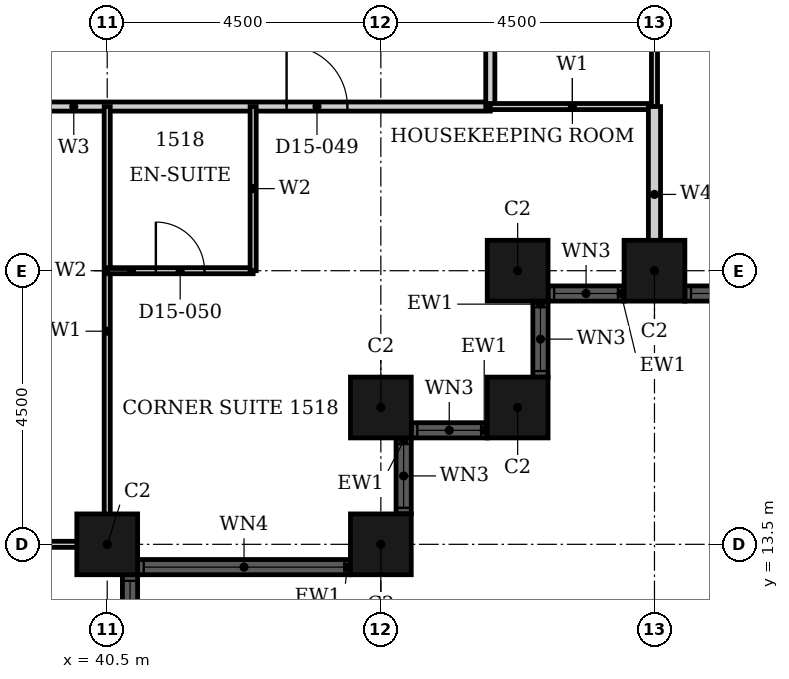
"""IFC4 building model, lengths in metres.
Left out: names, types, materials, properties, quantities, classifications, styles, units other than length and angle.
Written with IfcOpenShell. Run it as: python <this file> out.ifc"""

import sys

from ifc_helpers import new_model, si_unit, direction, frame, frame_2d, origin, origin_2d, place, context, subcontext, project, spatial, rectangle, hollow_rectangle, extrude, element, fill, save


model = new_model("IFC4")
c1 = context("Model", 3, precision=1e-05, world=origin(), true_north=direction((0.0, 1.0)))
c2 = subcontext(c1, "Body", "Model", "MODEL_VIEW")
j1 = project(units=[si_unit("LENGTHUNIT", "METRE"), si_unit("PLANEANGLEUNIT", "RADIAN")], contexts=[c1])
p1 = place(None, origin())
s1 = spatial("IfcSite", under=j1, at=p1, CompositionType="ELEMENT")
p2 = place(p1, origin())
s2 = spatial("IfcBuilding", under=s1, at=p2, CompositionType="ELEMENT")
p3 = place(p2, frame((0.0, 0.0, 67.2)))
s3 = spatial("IfcBuildingStorey", under=s2, at=p3, CompositionType="ELEMENT", Elevation=67.2)
for number, where, z_axis, x_axis in (
    (1, (40.5, 13.5, 0.0), (0.0, 0.0, 1.0), (1.0, 0.0, 0.0)),
    (2, (45.0, 13.5, 0.0), (0.0, 0.0, 1.0), (1.0, 0.0, 0.0)),
    (3, (45.0, 15.75, 0.0), (0.0, 0.0, 1.0), (1.0, 0.0, 0.0)),
    (4, (47.25, 15.75, 0.0), (0.0, 0.0, 1.0), (1.0, 0.0, 0.0)),
    (5, (47.25, 18.0, 0.0), (0.0, 0.0, 1.0), (1.0, 0.0, 0.0)),
    (6, (49.5, 18.0, 0.0), (0.0, 0.0, 1.0), (1.0, 0.0, 0.0)),
):
    element("IfcColumn", number, at=place(p3, frame(where, z_axis=z_axis, x_axis=x_axis)), inside=s3, PredefinedType="COLUMN", context=c2, shape_type="SweptSolid", body=[
        extrude(hollow_rectangle(XDim=1.0, YDim=1.0, WallThickness=0.032, at=origin_2d()), origin(), (0.0, 0.0, 1.0), 3.6),
    ])
p4 = place(p3, frame((40.875, 5.0, 0.0), z_axis=(0.0, 0.0, 1.0), x_axis=(0.0, 1.0, 0.0)))
e7 = element("IfcWall", 7, at=p4, inside=s3, PredefinedType="SOLIDWALL", context=c2, shape_type="SweptSolid", body=[
    extrude(rectangle(XDim=8.0, YDim=0.25, at=frame_2d((4.0, 0.0))), origin(), (0.0, 0.0, 1.0), 3.6),
])
p5 = place(p4, frame((0.1, 0.0, 0.9)))
e8 = element("IfcOpeningElement", 8, at=p5, cuts=e7, PredefinedType="OPENING", context=c2, shape_type="SweptSolid", body=[
    extrude(rectangle(XDim=3.3, YDim=2.08, at=frame_2d((1.65, 1.04))), frame((0.0, 0.135, 0.0), z_axis=(0.0, -1.0, 0.0), x_axis=(1.0, 0.0, 0.0)), (0.0, 0.0, 1.0), 0.27),
])
p6 = place(p4, frame((4.6, 0.0, 0.9)))
e9 = element("IfcOpeningElement", 9, at=p6, cuts=e7, PredefinedType="OPENING", context=c2, shape_type="SweptSolid", body=[
    extrude(rectangle(XDim=3.3, YDim=2.08, at=frame_2d((1.65, 1.04))), frame((0.0, 0.135, 0.0), z_axis=(0.0, -1.0, 0.0), x_axis=(1.0, 0.0, 0.0)), (0.0, 0.0, 1.0), 0.27),
])
p7 = place(p3, frame((41.0, 13.125, 0.0), z_axis=(0.0, 0.0, 1.0), x_axis=(1.0, 0.0, 0.0)))
e10 = element("IfcWall", 10, at=p7, inside=s3, PredefinedType="SOLIDWALL", context=c2, shape_type="SweptSolid", body=[
    extrude(rectangle(XDim=3.5, YDim=0.25, at=frame_2d((1.75, 0.0))), origin(), (0.0, 0.0, 1.0), 3.6),
])
p8 = place(p7, frame((0.1, 0.0, 0.9)))
e11 = element("IfcOpeningElement", 11, at=p8, cuts=e10, PredefinedType="OPENING", context=c2, shape_type="SweptSolid", body=[
    extrude(rectangle(XDim=3.3, YDim=2.08, at=frame_2d((1.65, 1.04))), frame((0.0, 0.135, 0.0), z_axis=(0.0, -1.0, 0.0), x_axis=(1.0, 0.0, 0.0)), (0.0, 0.0, 1.0), 0.27),
])
p9 = place(p3, frame((45.375, 14.0, 0.0), z_axis=(0.0, 0.0, 1.0), x_axis=(0.0, 1.0, 0.0)))
e12 = element("IfcWall", 12, at=p9, inside=s3, PredefinedType="SOLIDWALL", context=c2, shape_type="SweptSolid", body=[
    extrude(rectangle(XDim=1.25, YDim=0.25, at=frame_2d((0.625, 0.0))), origin(), (0.0, 0.0, 1.0), 3.6),
])
p10 = place(p9, frame((0.1, 0.0, 0.9)))
e13 = element("IfcOpeningElement", 13, at=p10, cuts=e12, PredefinedType="OPENING", context=c2, shape_type="SweptSolid", body=[
    extrude(rectangle(XDim=1.05, YDim=2.08, at=frame_2d((0.525, 1.04))), frame((0.0, 0.135, 0.0), z_axis=(0.0, -1.0, 0.0), x_axis=(1.0, 0.0, 0.0)), (0.0, 0.0, 1.0), 0.27),
])
p11 = place(p3, frame((45.5, 15.375, 0.0), z_axis=(0.0, 0.0, 1.0), x_axis=(1.0, 0.0, 0.0)))
e14 = element("IfcWall", 14, at=p11, inside=s3, PredefinedType="SOLIDWALL", context=c2, shape_type="SweptSolid", body=[
    extrude(rectangle(XDim=1.25, YDim=0.25, at=frame_2d((0.625, 0.0))), origin(), (0.0, 0.0, 1.0), 3.6),
])
p12 = place(p11, frame((0.1, 0.0, 0.9)))
e15 = element("IfcOpeningElement", 15, at=p12, cuts=e14, PredefinedType="OPENING", context=c2, shape_type="SweptSolid", body=[
    extrude(rectangle(XDim=1.05, YDim=2.08, at=frame_2d((0.525, 1.04))), frame((0.0, 0.135, 0.0), z_axis=(0.0, -1.0, 0.0), x_axis=(1.0, 0.0, 0.0)), (0.0, 0.0, 1.0), 0.27),
])
p13 = place(p3, frame((47.625, 16.25, 0.0), z_axis=(0.0, 0.0, 1.0), x_axis=(0.0, 1.0, 0.0)))
e16 = element("IfcWall", 16, at=p13, inside=s3, PredefinedType="SOLIDWALL", context=c2, shape_type="SweptSolid", body=[
    extrude(rectangle(XDim=1.25, YDim=0.25, at=frame_2d((0.625, 0.0))), origin(), (0.0, 0.0, 1.0), 3.6),
])
p14 = place(p13, frame((0.1, 0.0, 0.9)))
e17 = element("IfcOpeningElement", 17, at=p14, cuts=e16, PredefinedType="OPENING", context=c2, shape_type="SweptSolid", body=[
    extrude(rectangle(XDim=1.05, YDim=2.08, at=frame_2d((0.525, 1.04))), frame((0.0, 0.135, 0.0), z_axis=(0.0, -1.0, 0.0), x_axis=(1.0, 0.0, 0.0)), (0.0, 0.0, 1.0), 0.27),
])
p15 = place(p3, frame((47.75, 17.625, 0.0), z_axis=(0.0, 0.0, 1.0), x_axis=(1.0, 0.0, 0.0)))
e18 = element("IfcWall", 18, at=p15, inside=s3, PredefinedType="SOLIDWALL", context=c2, shape_type="SweptSolid", body=[
    extrude(rectangle(XDim=1.25, YDim=0.25, at=frame_2d((0.625, 0.0))), origin(), (0.0, 0.0, 1.0), 3.6),
])
p16 = place(p15, frame((0.1, 0.0, 0.9)))
e19 = element("IfcOpeningElement", 19, at=p16, cuts=e18, PredefinedType="OPENING", context=c2, shape_type="SweptSolid", body=[
    extrude(rectangle(XDim=1.05, YDim=2.08, at=frame_2d((0.525, 1.04))), frame((0.0, 0.135, 0.0), z_axis=(0.0, -1.0, 0.0), x_axis=(1.0, 0.0, 0.0)), (0.0, 0.0, 1.0), 0.27),
])
p17 = place(p3, frame((50.0, 17.625, 0.0), z_axis=(0.0, 0.0, 1.0), x_axis=(1.0, 0.0, 0.0)))
e20 = element("IfcWall", 20, at=p17, inside=s3, PredefinedType="SOLIDWALL", context=c2, shape_type="SweptSolid", body=[
    extrude(rectangle(XDim=8.0, YDim=0.25, at=frame_2d((4.0, 0.0))), origin(), (0.0, 0.0, 1.0), 3.6),
])
p18 = place(p17, frame((0.1, 0.0, 0.9)))
e21 = element("IfcOpeningElement", 21, at=p18, cuts=e20, PredefinedType="OPENING", context=c2, shape_type="SweptSolid", body=[
    extrude(rectangle(XDim=3.3, YDim=2.08, at=frame_2d((1.65, 1.04))), frame((0.0, 0.135, 0.0), z_axis=(0.0, -1.0, 0.0), x_axis=(1.0, 0.0, 0.0)), (0.0, 0.0, 1.0), 0.27),
])
p19 = place(p17, frame((4.6, 0.0, 0.9)))
e22 = element("IfcOpeningElement", 22, at=p19, cuts=e20, PredefinedType="OPENING", context=c2, shape_type="SweptSolid", body=[
    extrude(rectangle(XDim=3.3, YDim=2.08, at=frame_2d((1.65, 1.04))), frame((0.0, 0.135, 0.0), z_axis=(0.0, -1.0, 0.0), x_axis=(1.0, 0.0, 0.0)), (0.0, 0.0, 1.0), 0.27),
])
p20 = place(p3, frame((31.5, 20.7, 0.0), z_axis=(0.0, 0.0, 1.0), x_axis=(1.0, 0.0, 0.0)))
e23 = element("IfcWall", 23, at=p20, inside=s3, PredefinedType="PARTITIONING", context=c2, shape_type="SweptSolid", body=[
    extrude(rectangle(XDim=15.3, YDim=0.15, at=frame_2d((7.65, 0.0))), origin(), (0.0, 0.0, 1.0), 3.3),
])
p21 = place(p20, frame((11.95, 0.0, 0.0)))
e24 = element("IfcOpeningElement", 24, at=p21, cuts=e23, PredefinedType="OPENING", context=c2, shape_type="SweptSolid", body=[
    extrude(rectangle(XDim=1.0, YDim=2.1, at=frame_2d((0.5, 1.05))), frame((0.0, 0.085, 0.0), z_axis=(0.0, -1.0, 0.0), x_axis=(1.0, 0.0, 0.0)), (0.0, 0.0, 1.0), 0.17),
])
p22 = place(p20, frame((4.05, 0.0, 0.0)))
e25 = element("IfcOpeningElement", 25, at=p22, cuts=e23, PredefinedType="OPENING", context=c2, shape_type="SweptSolid", body=[
    extrude(rectangle(XDim=0.9, YDim=2.1, at=frame_2d((0.45, 1.05))), frame((0.0, 0.085, 0.0), z_axis=(0.0, -1.0, 0.0), x_axis=(1.0, 0.0, 0.0)), (0.0, 0.0, 1.0), 0.17),
])
p23 = place(p3, frame((46.8, 20.7, 0.0), z_axis=(0.0, 0.0, 1.0), x_axis=(0.0, 1.0, 0.0)))
e26 = element("IfcWall", 26, at=p23, inside=s3, PredefinedType="PARTITIONING", context=c2, shape_type="SweptSolid", body=[
    extrude(rectangle(XDim=6.3, YDim=0.15, at=frame_2d((3.15, 0.0))), origin(), (0.0, 0.0, 1.0), 3.3),
])
p24 = place(p23, frame((2.65, 0.0, 0.0)))
e27 = element("IfcOpeningElement", 27, at=p24, cuts=e26, PredefinedType="OPENING", context=c2, shape_type="SweptSolid", body=[
    extrude(rectangle(XDim=0.9, YDim=2.1, at=frame_2d((0.45, 1.05))), frame((0.0, 0.085, 0.0), z_axis=(0.0, -1.0, 0.0), x_axis=(1.0, 0.0, 0.0)), (0.0, 0.0, 1.0), 0.17),
])
p25 = place(p3, frame((31.5, 13.5, 0.0), z_axis=(0.0, 0.0, 1.0), x_axis=(1.0, 0.0, 0.0)))
e28 = element("IfcWall", 28, at=p25, inside=s3, PredefinedType="PARTITIONING", context=c2, shape_type="SweptSolid", body=[
    extrude(rectangle(XDim=9.19, YDim=0.1, at=frame_2d((4.595, 0.0))), origin(), (0.0, 0.0, 1.0), 2.38),
])
p26 = place(p3, frame((46.8, 20.7, 0.0), z_axis=(0.0, 0.0, 1.0), x_axis=(1.0, 0.0, 0.0)))
e29 = element("IfcWall", 29, at=p26, inside=s3, PredefinedType="PARTITIONING", context=c2, shape_type="SweptSolid", body=[
    extrude(rectangle(XDim=2.7, YDim=0.1, at=frame_2d((1.35, 0.0))), origin(), (0.0, 0.0, 1.0), 3.3),
])
p27 = place(p3, frame((40.5, 13.31, 0.0), z_axis=(0.0, 0.0, 1.0), x_axis=(0.0, 1.0, 0.0)))
e30 = element("IfcWall", 30, at=p27, inside=s3, PredefinedType="PARTITIONING", context=c2, shape_type="SweptSolid", body=[
    extrude(rectangle(XDim=7.39, YDim=0.1, at=frame_2d((3.695, 0.0))), origin(), (0.0, 0.0, 1.0), 3.3),
])
p28 = place(p3, frame((49.5, 20.7, 0.0), z_axis=(0.0, 0.0, 1.0), x_axis=(0.0, 1.0, 0.0)))
e31 = element("IfcWall", 31, at=p28, inside=s3, PredefinedType="PARTITIONING", context=c2, shape_type="SweptSolid", body=[
    extrude(rectangle(XDim=6.3, YDim=0.1, at=frame_2d((3.15, 0.0))), origin(), (0.0, 0.0, 1.0), 2.38),
])
p29 = place(p3, frame((49.5, 17.81, 0.0), z_axis=(0.0, 0.0, 1.0), x_axis=(0.0, 1.0, 0.0)))
e32 = element("IfcWall", 32, at=p29, inside=s3, PredefinedType="PARTITIONING", context=c2, shape_type="SweptSolid", body=[
    extrude(rectangle(XDim=2.89, YDim=0.2, at=frame_2d((1.445, 0.0))), origin(), (0.0, 0.0, 1.0), 2.38),
])
p30 = place(p3, frame((40.5, 18.0, 0.0), z_axis=(0.0, 0.0, 1.0), x_axis=(1.0, 0.0, 0.0)))
e33 = element("IfcWall", 33, at=p30, inside=s3, PredefinedType="PARTITIONING", context=c2, shape_type="SweptSolid", body=[
    extrude(rectangle(XDim=2.4, YDim=0.1, at=frame_2d((1.2, 0.0))), origin(), (0.0, 0.0, 1.0), 3.3),
])
p31 = place(p30, frame((0.8, 0.0, 0.0)))
e34 = element("IfcOpeningElement", 34, at=p31, cuts=e33, PredefinedType="OPENING", context=c2, shape_type="SweptSolid", body=[
    extrude(rectangle(XDim=0.8, YDim=2.1, at=frame_2d((0.4, 1.05))), frame((0.0, 0.06, 0.0), z_axis=(0.0, -1.0, 0.0), x_axis=(1.0, 0.0, 0.0)), (0.0, 0.0, 1.0), 0.12),
])
p32 = place(p3, frame((42.9, 18.0, 0.0), z_axis=(0.0, 0.0, 1.0), x_axis=(0.0, 1.0, 0.0)))
e35 = element("IfcWall", 35, at=p32, inside=s3, PredefinedType="PARTITIONING", context=c2, shape_type="SweptSolid", body=[
    extrude(rectangle(XDim=2.7, YDim=0.1, at=frame_2d((1.35, 0.0))), origin(), (0.0, 0.0, 1.0), 3.3),
])
p33 = place(p6, origin())
e36 = element("IfcWindow", 36, at=p33, inside=s3, PartitioningType="SINGLE_PANEL", PredefinedType="WINDOW", context=c2, shape_type="SweptSolid", body=[
    extrude(rectangle(XDim=3.3, YDim=2.08, at=frame_2d((1.65, 1.04))), frame((0.0, 0.03, 0.0), z_axis=(0.0, -1.0, 0.0), x_axis=(1.0, 0.0, 0.0)), (0.0, 0.0, 1.0), 0.06),
])
fill(e9, e36)
p34 = place(p8, origin())
e37 = element("IfcWindow", 37, at=p34, inside=s3, PartitioningType="SINGLE_PANEL", PredefinedType="WINDOW", context=c2, shape_type="SweptSolid", body=[
    extrude(rectangle(XDim=3.3, YDim=2.08, at=frame_2d((1.65, 1.04))), frame((0.0, 0.03, 0.0), z_axis=(0.0, -1.0, 0.0), x_axis=(1.0, 0.0, 0.0)), (0.0, 0.0, 1.0), 0.06),
])
fill(e11, e37)
p35 = place(p10, origin())
e38 = element("IfcWindow", 38, at=p35, inside=s3, PartitioningType="SINGLE_PANEL", PredefinedType="WINDOW", context=c2, shape_type="SweptSolid", body=[
    extrude(rectangle(XDim=1.05, YDim=2.08, at=frame_2d((0.525, 1.04))), frame((0.0, 0.03, 0.0), z_axis=(0.0, -1.0, 0.0), x_axis=(1.0, 0.0, 0.0)), (0.0, 0.0, 1.0), 0.06),
])
fill(e13, e38)
p36 = place(p12, origin())
e39 = element("IfcWindow", 39, at=p36, inside=s3, PartitioningType="SINGLE_PANEL", PredefinedType="WINDOW", context=c2, shape_type="SweptSolid", body=[
    extrude(rectangle(XDim=1.05, YDim=2.08, at=frame_2d((0.525, 1.04))), frame((0.0, 0.03, 0.0), z_axis=(0.0, -1.0, 0.0), x_axis=(1.0, 0.0, 0.0)), (0.0, 0.0, 1.0), 0.06),
])
fill(e15, e39)
p37 = place(p14, origin())
e40 = element("IfcWindow", 40, at=p37, inside=s3, PartitioningType="SINGLE_PANEL", PredefinedType="WINDOW", context=c2, shape_type="SweptSolid", body=[
    extrude(rectangle(XDim=1.05, YDim=2.08, at=frame_2d((0.525, 1.04))), frame((0.0, 0.03, 0.0), z_axis=(0.0, -1.0, 0.0), x_axis=(1.0, 0.0, 0.0)), (0.0, 0.0, 1.0), 0.06),
])
fill(e17, e40)
p38 = place(p16, origin())
e41 = element("IfcWindow", 41, at=p38, inside=s3, PartitioningType="SINGLE_PANEL", PredefinedType="WINDOW", context=c2, shape_type="SweptSolid", body=[
    extrude(rectangle(XDim=1.05, YDim=2.08, at=frame_2d((0.525, 1.04))), frame((0.0, 0.03, 0.0), z_axis=(0.0, -1.0, 0.0), x_axis=(1.0, 0.0, 0.0)), (0.0, 0.0, 1.0), 0.06),
])
fill(e19, e41)
p39 = place(p18, origin())
e42 = element("IfcWindow", 42, at=p39, inside=s3, PartitioningType="SINGLE_PANEL", PredefinedType="WINDOW", context=c2, shape_type="SweptSolid", body=[
    extrude(rectangle(XDim=3.3, YDim=2.08, at=frame_2d((1.65, 1.04))), frame((0.0, 0.03, 0.0), z_axis=(0.0, -1.0, 0.0), x_axis=(1.0, 0.0, 0.0)), (0.0, 0.0, 1.0), 0.06),
])
fill(e21, e42)
p40 = place(p21, origin())
e43 = element("IfcDoor", 43, at=p40, inside=s3, OperationType="SINGLE_SWING_RIGHT", PredefinedType="DOOR", context=c2, shape_type="SweptSolid", body=[
    extrude(rectangle(XDim=1.0, YDim=2.1, at=frame_2d((0.5, 1.05))), frame((0.0, 0.025, 0.0), z_axis=(0.0, -1.0, 0.0), x_axis=(1.0, 0.0, 0.0)), (0.0, 0.0, 1.0), 0.05),
])
fill(e24, e43)
p41 = place(p31, origin())
e44 = element("IfcDoor", 44, at=p41, inside=s3, OperationType="SINGLE_SWING_LEFT", PredefinedType="DOOR", context=c2, shape_type="SweptSolid", body=[
    extrude(rectangle(XDim=0.8, YDim=2.1, at=frame_2d((0.4, 1.05))), frame((0.0, 0.025, 0.0), z_axis=(0.0, -1.0, 0.0), x_axis=(1.0, 0.0, 0.0)), (0.0, 0.0, 1.0), 0.05),
])
fill(e34, e44)
save(model, sys.argv[1])
